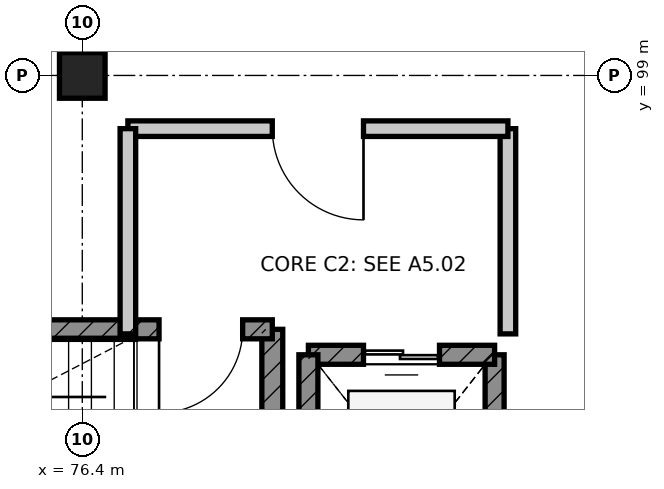
"""IFC4 building model, lengths in metres.
Left out: names, types, materials, properties, quantities, classifications, styles, units other than length and angle.
Written with IfcOpenShell. Run it as: python <this file> out.ifc"""

import sys

from ifc_helpers import new_model, si_unit, direction, frame, frame_2d, origin, origin_2d, place, context, subcontext, project, spatial, rectangle, extrude, element, fill, save


model = new_model("IFC4")
c1 = context("Model", 3, precision=1e-05, world=origin(), true_north=direction((0.0, 1.0)))
c2 = subcontext(c1, "Body", "Model", "MODEL_VIEW")
j1 = project(units=[si_unit("LENGTHUNIT", "METRE"), si_unit("PLANEANGLEUNIT", "RADIAN")], contexts=[c1])
p1 = place(None, origin())
s1 = spatial("IfcSite", under=j1, at=p1, CompositionType="ELEMENT")
p2 = place(p1, origin())
s2 = spatial("IfcBuilding", under=s1, at=p2, CompositionType="ELEMENT")
p3 = place(p2, frame((0.0, 0.0, 37.2)))
s3 = spatial("IfcBuildingStorey", under=s2, at=p3, CompositionType="ELEMENT", Elevation=37.2)
p4 = place(p3, frame((76.4, 99.0, 0.0), z_axis=(0.0, 0.0, 1.0), x_axis=(1.0, 0.0, 0.0)))
e1 = element("IfcColumn", 1, at=p4, inside=s3, PredefinedType="COLUMN", context=c2, shape_type="SweptSolid", body=[
    extrude(rectangle(XDim=0.6, YDim=0.6, at=origin_2d()), origin(), (0.0, 0.0, 1.0), 3.6),
])
p5 = place(p3, frame((78.9, 92.1, 0.0), z_axis=(0.0, 0.0, 1.0), x_axis=(0.0, 1.0, 0.0)))
e2 = element("IfcWall", 2, at=p5, inside=s3, PredefinedType="SHEAR", context=c2, shape_type="SweptSolid", body=[
    extrude(rectangle(XDim=3.56, YDim=0.275, at=frame_2d((1.78, 0.0))), origin(), (0.0, 0.0, 1.0), 3.38),
])
p6 = place(p3, frame((78.9, 95.66, 0.0), z_axis=(0.0, 0.0, 1.0), x_axis=(-1.0, 0.0, 0.0)))
e3 = element("IfcWall", 3, at=p6, inside=s3, PredefinedType="SHEAR", context=c2, shape_type="SweptSolid", body=[
    extrude(rectangle(XDim=8.4, YDim=0.25, at=frame_2d((4.2, 0.0))), origin(), (0.0, 0.0, 1.0), 3.38),
])
p7 = place(p6, frame((0.39, 0.0, 0.0)))
e4 = element("IfcOpeningElement", 4, at=p7, cuts=e3, PredefinedType="OPENING", context=c2, shape_type="SweptSolid", body=[
    extrude(rectangle(XDim=1.1, YDim=2.1, at=frame_2d((0.55, 1.05))), frame((0.0, 0.135, 0.0), z_axis=(0.0, -1.0, 0.0), x_axis=(1.0, 0.0, 0.0)), (0.0, 0.0, 1.0), 0.27),
])
p8 = place(p3, frame((81.825, 92.275, 0.0), z_axis=(0.0, 0.0, 1.0), x_axis=(0.0, 1.0, 0.0)))
e5 = element("IfcWall", 5, at=p8, inside=s3, PredefinedType="SHEAR", context=c2, shape_type="SweptSolid", body=[
    extrude(rectangle(XDim=3.05, YDim=0.25, at=frame_2d((1.525, 0.0))), origin(), (0.0, 0.0, 1.0), 3.38),
])
p9 = place(p3, frame((81.825, 95.325, 0.0), z_axis=(0.0, 0.0, 1.0), x_axis=(-1.0, 0.0, 0.0)))
e6 = element("IfcWall", 6, at=p9, inside=s3, PredefinedType="SHEAR", context=c2, shape_type="SweptSolid", body=[
    extrude(rectangle(XDim=2.45, YDim=0.25, at=frame_2d((1.225, 0.0))), origin(), (0.0, 0.0, 1.0), 3.38),
])
p10 = place(p9, frame((0.725, 0.0, 0.0)))
e7 = element("IfcOpeningElement", 7, at=p10, cuts=e6, PredefinedType="OPENING", context=c2, shape_type="SweptSolid", body=[
    extrude(rectangle(XDim=1.0, YDim=2.15, at=frame_2d((0.5, 1.075))), frame((0.0, 0.135, 0.0), z_axis=(0.0, -1.0, 0.0), x_axis=(1.0, 0.0, 0.0)), (0.0, 0.0, 1.0), 0.27),
])
p11 = place(p3, frame((79.375, 95.325, 0.0), z_axis=(0.0, 0.0, 1.0), x_axis=(0.0, -1.0, 0.0)))
e8 = element("IfcWall", 8, at=p11, inside=s3, PredefinedType="SHEAR", context=c2, shape_type="SweptSolid", body=[
    extrude(rectangle(XDim=3.05, YDim=0.25, at=frame_2d((1.525, 0.0))), origin(), (0.0, 0.0, 1.0), 3.38),
])
p12 = place(p3, frame((82.0, 95.6, 0.0), z_axis=(0.0, 0.0, 1.0), x_axis=(0.0, 1.0, 0.0)))
e9 = element("IfcWall", 9, at=p12, inside=s3, PredefinedType="PARTITIONING", context=c2, shape_type="SweptSolid", body=[
    extrude(rectangle(XDim=2.7, YDim=0.205, at=frame_2d((1.35, 0.0))), origin(), (0.0, 0.0, 1.0), 3.38),
])
p13 = place(p3, frame((82.0, 98.3, 0.0), z_axis=(0.0, 0.0, 1.0), x_axis=(-1.0, 0.0, 0.0)))
e10 = element("IfcWall", 10, at=p13, inside=s3, PredefinedType="PARTITIONING", context=c2, shape_type="SweptSolid", body=[
    extrude(rectangle(XDim=5.0, YDim=0.205, at=frame_2d((2.5, 0.0))), origin(), (0.0, 0.0, 1.0), 3.38),
])
p14 = place(p13, frame((1.9, 0.0, 0.0)))
e11 = element("IfcOpeningElement", 11, at=p14, cuts=e10, PredefinedType="OPENING", context=c2, shape_type="SweptSolid", body=[
    extrude(rectangle(XDim=1.2, YDim=2.1, at=frame_2d((0.6, 1.05))), frame((0.0, 0.113, 0.0), z_axis=(0.0, -1.0, 0.0), x_axis=(1.0, 0.0, 0.0)), (0.0, 0.0, 1.0), 0.225),
])
p15 = place(p3, frame((77.0, 98.3, 0.0), z_axis=(0.0, 0.0, 1.0), x_axis=(0.0, -1.0, 0.0)))
e12 = element("IfcWall", 12, at=p15, inside=s3, PredefinedType="PARTITIONING", context=c2, shape_type="SweptSolid", body=[
    extrude(rectangle(XDim=2.7, YDim=0.205, at=frame_2d((1.35, 0.0))), origin(), (0.0, 0.0, 1.0), 3.38),
])
p16 = place(p7, origin())
e13 = element("IfcDoor", 13, at=p16, inside=s3, OperationType="SINGLE_SWING_RIGHT", PredefinedType="DOOR", context=c2, shape_type="SweptSolid", body=[
    extrude(rectangle(XDim=1.1, YDim=2.1, at=frame_2d((0.55, 1.05))), frame((0.0, 0.025, 0.0), z_axis=(0.0, -1.0, 0.0), x_axis=(1.0, 0.0, 0.0)), (0.0, 0.0, 1.0), 0.05),
])
fill(e4, e13)
p17 = place(p10, origin())
e14 = element("IfcDoor", 14, at=p17, inside=s3, OperationType="DOUBLE_DOOR_SLIDING", PredefinedType="DOOR", context=c2, shape_type="SweptSolid", body=[
    extrude(rectangle(XDim=1.0, YDim=2.15, at=frame_2d((0.5, 1.075))), frame((0.0, 0.025, 0.0), z_axis=(0.0, -1.0, 0.0), x_axis=(1.0, 0.0, 0.0)), (0.0, 0.0, 1.0), 0.05),
])
fill(e7, e14)
p18 = place(p14, origin())
e15 = element("IfcDoor", 15, at=p18, inside=s3, OperationType="SINGLE_SWING_LEFT", PredefinedType="DOOR", context=c2, shape_type="SweptSolid", body=[
    extrude(rectangle(XDim=1.2, YDim=2.1, at=frame_2d((0.6, 1.05))), frame((0.0, 0.025, 0.0), z_axis=(0.0, -1.0, 0.0), x_axis=(1.0, 0.0, 0.0)), (0.0, 0.0, 1.0), 0.05),
])
fill(e11, e15)
save(model, sys.argv[1])
